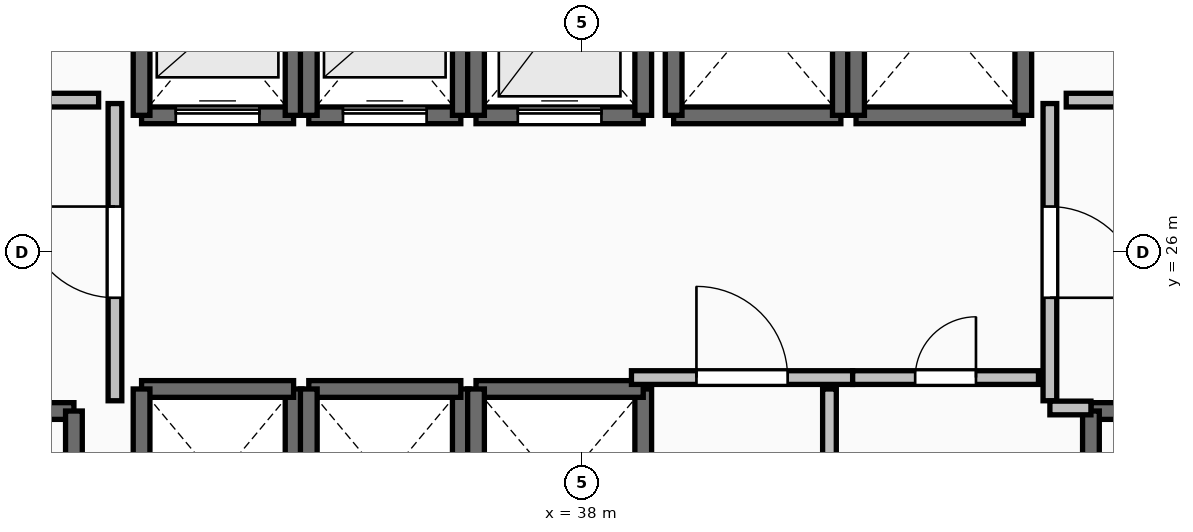
"""IFC4 building model, lengths in metres.
Left out: names, types, materials, properties, quantities, classifications, styles, units other than length and angle.
Written with IfcOpenShell. Run it as: python <this file> out.ifc"""

import sys

from ifc_helpers import new_model, si_unit, direction, frame, frame_2d, origin, place, context, subcontext, project, spatial, rectangle, extrude, element, fill, save


model = new_model("IFC4")
c1 = context("Model", 3, precision=1e-05, world=origin(), true_north=direction((0.0, 1.0)))
c2 = subcontext(c1, "Body", "Model", "MODEL_VIEW")
j1 = project(units=[si_unit("LENGTHUNIT", "METRE"), si_unit("PLANEANGLEUNIT", "RADIAN")], contexts=[c1])
p1 = place(None, origin())
s1 = spatial("IfcSite", under=j1, at=p1, CompositionType="ELEMENT")
p2 = place(p1, origin())
s2 = spatial("IfcBuilding", under=s1, at=p2, CompositionType="ELEMENT")
p3 = place(p2, frame((0.0, 0.0, 113.8)))
s3 = spatial("IfcBuildingStorey", under=s2, at=p3, CompositionType="ELEMENT", Elevation=113.8)
p4 = place(p3, frame((27.94, 23.91, 0.0), z_axis=(0.0, 0.0, 1.0), x_axis=(1.0, 0.0, 0.0)))
e1 = element("IfcWall", 1, at=p4, inside=s3, PredefinedType="SOLIDWALL", context=c2, shape_type="SweptSolid", body=[
    extrude(rectangle(XDim=3.37, YDim=0.22, at=frame_2d((1.685, 0.0))), origin(), (0.0, 0.0, 1.0), 3.24),
])
p5 = place(p4, frame((1.135, 0.0, 0.0)))
e2 = element("IfcOpeningElement", 2, at=p5, cuts=e1, PredefinedType="OPENING", context=c2, shape_type="SweptSolid", body=[
    extrude(rectangle(XDim=1.1, YDim=2.15, at=frame_2d((0.55, 1.075))), frame((0.0, 0.125, 0.0), z_axis=(0.0, -1.0, 0.0), x_axis=(1.0, 0.0, 0.0)), (0.0, 0.0, 1.0), 0.25),
])
p6 = place(p3, frame((31.31, 23.91, 0.0), z_axis=(0.0, 0.0, 1.0), x_axis=(0.0, -1.0, 0.0)))
e3 = element("IfcWall", 3, at=p6, inside=s3, PredefinedType="SOLIDWALL", context=c2, shape_type="SweptSolid", body=[
    extrude(rectangle(XDim=7.42, YDim=0.22, at=frame_2d((3.71, 0.0))), origin(), (0.0, 0.0, 1.0), 3.24),
])
p7 = place(p3, frame((44.69, 23.91, 0.0), z_axis=(0.0, 0.0, 1.0), x_axis=(1.0, 0.0, 0.0)))
e4 = element("IfcWall", 4, at=p7, inside=s3, PredefinedType="SOLIDWALL", context=c2, shape_type="SweptSolid", body=[
    extrude(rectangle(XDim=3.37, YDim=0.22, at=frame_2d((1.685, 0.0))), origin(), (0.0, 0.0, 1.0), 3.24),
])
p8 = place(p7, frame((1.135, 0.0, 0.0)))
e5 = element("IfcOpeningElement", 5, at=p8, cuts=e4, PredefinedType="OPENING", context=c2, shape_type="SweptSolid", body=[
    extrude(rectangle(XDim=1.1, YDim=2.15, at=frame_2d((0.55, 1.075))), frame((0.0, 0.125, 0.0), z_axis=(0.0, -1.0, 0.0), x_axis=(1.0, 0.0, 0.0)), (0.0, 0.0, 1.0), 0.25),
])
p9 = place(p3, frame((44.69, 16.49, 0.0), z_axis=(0.0, 0.0, 1.0), x_axis=(0.0, 1.0, 0.0)))
e6 = element("IfcWall", 6, at=p9, inside=s3, PredefinedType="SOLIDWALL", context=c2, shape_type="SweptSolid", body=[
    extrude(rectangle(XDim=7.42, YDim=0.22, at=frame_2d((3.71, 0.0))), origin(), (0.0, 0.0, 1.0), 3.24),
])
p10 = place(p3, frame((32.2, 27.8, 0.0), z_axis=(0.0, 0.0, 1.0), x_axis=(1.0, 0.0, 0.0)))
e7 = element("IfcWall", 7, at=p10, inside=s3, PredefinedType="SOLIDWALL", context=c2, shape_type="SweptSolid", body=[
    extrude(rectangle(XDim=2.0, YDim=0.22, at=frame_2d((1.0, 0.0))), origin(), (0.0, 0.0, 1.0), 3.24),
])
p11 = place(p10, frame((0.45, 0.0, 0.0)))
e8 = element("IfcOpeningElement", 8, at=p11, cuts=e7, PredefinedType="OPENING", context=c2, shape_type="SweptSolid", body=[
    extrude(rectangle(XDim=1.1, YDim=2.2, at=frame_2d((0.55, 1.1))), frame((0.0, 0.125, 0.0), z_axis=(0.0, -1.0, 0.0), x_axis=(1.0, 0.0, 0.0)), (0.0, 0.0, 1.0), 0.25),
])
for number, where, z_axis, x_axis in (
    (9, (34.2, 27.8, 0.0), (0.0, 0.0, 1.0), (0.0, 1.0, 0.0)),
    (10, (32.2, 30.2, 0.0), (0.0, 0.0, 1.0), (0.0, -1.0, 0.0)),
):
    element("IfcWall", number, at=place(p3, frame(where, z_axis=z_axis, x_axis=x_axis)), inside=s3, PredefinedType="SOLIDWALL", context=c2, shape_type="SweptSolid", body=[
        extrude(rectangle(XDim=2.4, YDim=0.22, at=frame_2d((1.2, 0.0))), origin(), (0.0, 0.0, 1.0), 3.24),
    ])
p12 = place(p3, frame((34.4, 27.8, 0.0), z_axis=(0.0, 0.0, 1.0), x_axis=(1.0, 0.0, 0.0)))
e11 = element("IfcWall", 11, at=p12, inside=s3, PredefinedType="SOLIDWALL", context=c2, shape_type="SweptSolid", body=[
    extrude(rectangle(XDim=2.0, YDim=0.22, at=frame_2d((1.0, 0.0))), origin(), (0.0, 0.0, 1.0), 3.24),
])
p13 = place(p12, frame((0.45, 0.0, 0.0)))
e12 = element("IfcOpeningElement", 12, at=p13, cuts=e11, PredefinedType="OPENING", context=c2, shape_type="SweptSolid", body=[
    extrude(rectangle(XDim=1.1, YDim=2.2, at=frame_2d((0.55, 1.1))), frame((0.0, 0.125, 0.0), z_axis=(0.0, -1.0, 0.0), x_axis=(1.0, 0.0, 0.0)), (0.0, 0.0, 1.0), 0.25),
])
for number, where, z_axis, x_axis in (
    (13, (36.4, 27.8, 0.0), (0.0, 0.0, 1.0), (0.0, 1.0, 0.0)),
    (14, (34.4, 30.2, 0.0), (0.0, 0.0, 1.0), (0.0, -1.0, 0.0)),
):
    element("IfcWall", number, at=place(p3, frame(where, z_axis=z_axis, x_axis=x_axis)), inside=s3, PredefinedType="SOLIDWALL", context=c2, shape_type="SweptSolid", body=[
        extrude(rectangle(XDim=2.4, YDim=0.22, at=frame_2d((1.2, 0.0))), origin(), (0.0, 0.0, 1.0), 3.24),
    ])
p14 = place(p3, frame((36.6, 27.8, 0.0), z_axis=(0.0, 0.0, 1.0), x_axis=(1.0, 0.0, 0.0)))
e15 = element("IfcWall", 15, at=p14, inside=s3, PredefinedType="SOLIDWALL", context=c2, shape_type="SweptSolid", body=[
    extrude(rectangle(XDim=2.2, YDim=0.22, at=frame_2d((1.1, 0.0))), origin(), (0.0, 0.0, 1.0), 3.24),
])
p15 = place(p14, frame((0.55, 0.0, 0.0)))
e16 = element("IfcOpeningElement", 16, at=p15, cuts=e15, PredefinedType="OPENING", context=c2, shape_type="SweptSolid", body=[
    extrude(rectangle(XDim=1.1, YDim=2.2, at=frame_2d((0.55, 1.1))), frame((0.0, 0.125, 0.0), z_axis=(0.0, -1.0, 0.0), x_axis=(1.0, 0.0, 0.0)), (0.0, 0.0, 1.0), 0.25),
])
for number, where, z_axis, x_axis in (
    (17, (38.8, 27.8, 0.0), (0.0, 0.0, 1.0), (0.0, 1.0, 0.0)),
    (18, (36.6, 30.4, 0.0), (0.0, 0.0, 1.0), (0.0, -1.0, 0.0)),
):
    element("IfcWall", number, at=place(p3, frame(where, z_axis=z_axis, x_axis=x_axis)), inside=s3, PredefinedType="SOLIDWALL", context=c2, shape_type="SweptSolid", body=[
        extrude(rectangle(XDim=2.6, YDim=0.22, at=frame_2d((1.3, 0.0))), origin(), (0.0, 0.0, 1.0), 3.24),
    ])
p16 = place(p3, frame((34.2, 21.8, 0.0), z_axis=(0.0, 0.0, 1.0), x_axis=(0.0, 1.0, 0.0)))
e19 = element("IfcWall", 19, at=p16, inside=s3, PredefinedType="SOLIDWALL", context=c2, shape_type="SweptSolid", body=[
    extrude(rectangle(XDim=2.4, YDim=0.22, at=frame_2d((1.2, 0.0))), origin(), (0.0, 0.0, 1.0), 3.24),
])
p17 = place(p3, frame((34.2, 24.2, 0.0), z_axis=(0.0, 0.0, 1.0), x_axis=(-1.0, 0.0, 0.0)))
e20 = element("IfcWall", 20, at=p17, inside=s3, PredefinedType="SOLIDWALL", context=c2, shape_type="SweptSolid", body=[
    extrude(rectangle(XDim=2.0, YDim=0.22, at=frame_2d((1.0, 0.0))), origin(), (0.0, 0.0, 1.0), 3.24),
])
for number, where, z_axis, x_axis in (
    (21, (32.2, 24.2, 0.0), (0.0, 0.0, 1.0), (0.0, -1.0, 0.0)),
    (22, (36.4, 21.8, 0.0), (0.0, 0.0, 1.0), (0.0, 1.0, 0.0)),
):
    element("IfcWall", number, at=place(p3, frame(where, z_axis=z_axis, x_axis=x_axis)), inside=s3, PredefinedType="SOLIDWALL", context=c2, shape_type="SweptSolid", body=[
        extrude(rectangle(XDim=2.4, YDim=0.22, at=frame_2d((1.2, 0.0))), origin(), (0.0, 0.0, 1.0), 3.24),
    ])
p18 = place(p3, frame((36.4, 24.2, 0.0), z_axis=(0.0, 0.0, 1.0), x_axis=(-1.0, 0.0, 0.0)))
e23 = element("IfcWall", 23, at=p18, inside=s3, PredefinedType="SOLIDWALL", context=c2, shape_type="SweptSolid", body=[
    extrude(rectangle(XDim=2.0, YDim=0.22, at=frame_2d((1.0, 0.0))), origin(), (0.0, 0.0, 1.0), 3.24),
])
p19 = place(p3, frame((34.4, 24.2, 0.0), z_axis=(0.0, 0.0, 1.0), x_axis=(0.0, -1.0, 0.0)))
e24 = element("IfcWall", 24, at=p19, inside=s3, PredefinedType="SOLIDWALL", context=c2, shape_type="SweptSolid", body=[
    extrude(rectangle(XDim=2.4, YDim=0.22, at=frame_2d((1.2, 0.0))), origin(), (0.0, 0.0, 1.0), 3.24),
])
p20 = place(p3, frame((38.8, 21.6, 0.0), z_axis=(0.0, 0.0, 1.0), x_axis=(0.0, 1.0, 0.0)))
e25 = element("IfcWall", 25, at=p20, inside=s3, PredefinedType="SOLIDWALL", context=c2, shape_type="SweptSolid", body=[
    extrude(rectangle(XDim=2.6, YDim=0.22, at=frame_2d((1.3, 0.0))), origin(), (0.0, 0.0, 1.0), 3.24),
])
p21 = place(p3, frame((38.8, 24.2, 0.0), z_axis=(0.0, 0.0, 1.0), x_axis=(-1.0, 0.0, 0.0)))
e26 = element("IfcWall", 26, at=p21, inside=s3, PredefinedType="SOLIDWALL", context=c2, shape_type="SweptSolid", body=[
    extrude(rectangle(XDim=2.2, YDim=0.22, at=frame_2d((1.1, 0.0))), origin(), (0.0, 0.0, 1.0), 3.24),
])
p22 = place(p3, frame((36.6, 24.2, 0.0), z_axis=(0.0, 0.0, 1.0), x_axis=(0.0, -1.0, 0.0)))
e27 = element("IfcWall", 27, at=p22, inside=s3, PredefinedType="SOLIDWALL", context=c2, shape_type="SweptSolid", body=[
    extrude(rectangle(XDim=2.6, YDim=0.22, at=frame_2d((1.3, 0.0))), origin(), (0.0, 0.0, 1.0), 3.24),
])
p23 = place(p3, frame((39.2, 27.8, 0.0), z_axis=(0.0, 0.0, 1.0), x_axis=(1.0, 0.0, 0.0)))
e28 = element("IfcWall", 28, at=p23, inside=s3, PredefinedType="SOLIDWALL", context=c2, shape_type="SweptSolid", body=[
    extrude(rectangle(XDim=2.2, YDim=0.22, at=frame_2d((1.1, 0.0))), origin(), (0.0, 0.0, 1.0), 3.24),
])
for number, where, z_axis, x_axis in (
    (29, (41.4, 27.8, 0.0), (0.0, 0.0, 1.0), (0.0, 1.0, 0.0)),
    (30, (39.2, 30.4, 0.0), (0.0, 0.0, 1.0), (0.0, -1.0, 0.0)),
):
    element("IfcWall", number, at=place(p3, frame(where, z_axis=z_axis, x_axis=x_axis)), inside=s3, PredefinedType="SOLIDWALL", context=c2, shape_type="SweptSolid", body=[
        extrude(rectangle(XDim=2.6, YDim=0.22, at=frame_2d((1.3, 0.0))), origin(), (0.0, 0.0, 1.0), 3.24),
    ])
p24 = place(p3, frame((41.6, 27.8, 0.0), z_axis=(0.0, 0.0, 1.0), x_axis=(1.0, 0.0, 0.0)))
e31 = element("IfcWall", 31, at=p24, inside=s3, PredefinedType="SOLIDWALL", context=c2, shape_type="SweptSolid", body=[
    extrude(rectangle(XDim=2.2, YDim=0.22, at=frame_2d((1.1, 0.0))), origin(), (0.0, 0.0, 1.0), 3.24),
])
for number, where, z_axis, x_axis in (
    (32, (43.8, 27.8, 0.0), (0.0, 0.0, 1.0), (0.0, 1.0, 0.0)),
    (33, (41.6, 30.4, 0.0), (0.0, 0.0, 1.0), (0.0, -1.0, 0.0)),
):
    element("IfcWall", number, at=place(p3, frame(where, z_axis=z_axis, x_axis=x_axis)), inside=s3, PredefinedType="SOLIDWALL", context=c2, shape_type="SweptSolid", body=[
        extrude(rectangle(XDim=2.6, YDim=0.22, at=frame_2d((1.3, 0.0))), origin(), (0.0, 0.0, 1.0), 3.24),
    ])
p25 = place(p3, frame((31.85, 24.045, 0.0), z_axis=(0.0, 0.0, 1.0), x_axis=(0.0, 1.0, 0.0)))
e34 = element("IfcWall", 34, at=p25, inside=s3, PredefinedType="PARTITIONING", context=c2, shape_type="SweptSolid", body=[
    extrude(rectangle(XDim=3.91, YDim=0.18, at=frame_2d((1.955, 0.0))), origin(), (0.0, 0.0, 1.0), 3.24),
])
p26 = place(p25, frame((1.355, 0.0, 0.0)))
e35 = element("IfcOpeningElement", 35, at=p26, cuts=e34, PredefinedType="OPENING", context=c2, shape_type="SweptSolid", body=[
    extrude(rectangle(XDim=1.2, YDim=2.15, at=frame_2d((0.6, 1.075))), frame((0.0, 0.105, 0.0), z_axis=(0.0, -1.0, 0.0), x_axis=(1.0, 0.0, 0.0)), (0.0, 0.0, 1.0), 0.21),
])
p27 = place(p3, frame((44.15, 27.955, 0.0), z_axis=(0.0, 0.0, 1.0), x_axis=(0.0, -1.0, 0.0)))
e36 = element("IfcWall", 36, at=p27, inside=s3, PredefinedType="PARTITIONING", context=c2, shape_type="SweptSolid", body=[
    extrude(rectangle(XDim=3.91, YDim=0.18, at=frame_2d((1.955, 0.0))), origin(), (0.0, 0.0, 1.0), 3.24),
])
p28 = place(p27, frame((1.355, 0.0, 0.0)))
e37 = element("IfcOpeningElement", 37, at=p28, cuts=e36, PredefinedType="OPENING", context=c2, shape_type="SweptSolid", body=[
    extrude(rectangle(XDim=1.2, YDim=2.15, at=frame_2d((0.6, 1.075))), frame((0.0, 0.105, 0.0), z_axis=(0.0, -1.0, 0.0), x_axis=(1.0, 0.0, 0.0)), (0.0, 0.0, 1.0), 0.21),
])
p29 = place(p3, frame((44.15, 23.95, 0.0), z_axis=(0.0, 0.0, 1.0), x_axis=(1.0, 0.0, 0.0)))
e38 = element("IfcWall", 38, at=p29, inside=s3, PredefinedType="PARTITIONING", context=c2, shape_type="SweptSolid", body=[
    extrude(rectangle(XDim=0.54, YDim=0.18, at=frame_2d((0.27, 0.0))), origin(), (0.0, 0.0, 1.0), 3.24),
])
p30 = place(p3, frame((38.645, 24.35, 0.0), z_axis=(0.0, 0.0, 1.0), x_axis=(1.0, 0.0, 0.0)))
e39 = element("IfcWall", 39, at=p30, inside=s3, PredefinedType="PARTITIONING", context=c2, shape_type="SweptSolid", body=[
    extrude(rectangle(XDim=2.91, YDim=0.18, at=frame_2d((1.455, 0.0))), origin(), (0.0, 0.0, 1.0), 3.24),
])
p31 = place(p30, frame((0.855, 0.0, 0.0)))
e40 = element("IfcOpeningElement", 40, at=p31, cuts=e39, PredefinedType="OPENING", context=c2, shape_type="SweptSolid", body=[
    extrude(rectangle(XDim=1.2, YDim=2.15, at=frame_2d((0.6, 1.075))), frame((0.0, 0.105, 0.0), z_axis=(0.0, -1.0, 0.0), x_axis=(1.0, 0.0, 0.0)), (0.0, 0.0, 1.0), 0.21),
])
p32 = place(p3, frame((41.555, 24.35, 0.0), z_axis=(0.0, 0.0, 1.0), x_axis=(1.0, 0.0, 0.0)))
e41 = element("IfcWall", 41, at=p32, inside=s3, PredefinedType="PARTITIONING", context=c2, shape_type="SweptSolid", body=[
    extrude(rectangle(XDim=2.445, YDim=0.18, at=frame_2d((1.223, 0.0))), origin(), (0.0, 0.0, 1.0), 3.24),
])
p33 = place(p32, frame((0.823, 0.0, 0.0)))
e42 = element("IfcOpeningElement", 42, at=p33, cuts=e41, PredefinedType="OPENING", context=c2, shape_type="SweptSolid", body=[
    extrude(rectangle(XDim=0.8, YDim=2.05, at=frame_2d((0.4, 1.025))), frame((0.0, 0.105, 0.0), z_axis=(0.0, -1.0, 0.0), x_axis=(1.0, 0.0, 0.0)), (0.0, 0.0, 1.0), 0.21),
])
p34 = place(p3, frame((41.25, 16.32, 0.0), z_axis=(0.0, 0.0, 1.0), x_axis=(0.0, 1.0, 0.0)))
e43 = element("IfcWall", 43, at=p34, inside=s3, PredefinedType="PARTITIONING", context=c2, shape_type="SweptSolid", body=[
    extrude(rectangle(XDim=7.88, YDim=0.18, at=frame_2d((3.94, 0.0))), origin(), (0.0, 0.0, 1.0), 3.24),
])
p35 = place(p34, frame((3.54, 0.0, 0.0)))
e44 = element("IfcOpeningElement", 44, at=p35, cuts=e43, PredefinedType="OPENING", context=c2, shape_type="SweptSolid", body=[
    extrude(rectangle(XDim=0.8, YDim=2.05, at=frame_2d((0.4, 1.025))), frame((0.0, 0.105, 0.0), z_axis=(0.0, -1.0, 0.0), x_axis=(1.0, 0.0, 0.0)), (0.0, 0.0, 1.0), 0.21),
])
for number, where, z_axis, x_axis in (
    (45, (31.635, 28.0, 0.0), (0.0, 0.0, 1.0), (-1.0, 0.0, 0.0)),
    (46, (45.28, 28.0, 0.0), (0.0, 0.0, 1.0), (-1.0, 0.0, 0.0)),
):
    element("IfcWall", number, at=place(p3, frame(where, z_axis=z_axis, x_axis=x_axis)), inside=s3, PredefinedType="PARTITIONING", context=c2, shape_type="SweptSolid", body=[
        extrude(rectangle(XDim=0.915, YDim=0.18, at=frame_2d((0.458, 0.0))), origin(), (0.0, 0.0, 1.0), 3.24),
    ])
p36 = place(p11, origin())
e47 = element("IfcDoor", 47, at=p36, inside=s3, OperationType="SLIDING_TO_LEFT", PredefinedType="DOOR", context=c2, shape_type="SweptSolid", body=[
    extrude(rectangle(XDim=1.1, YDim=2.2, at=frame_2d((0.55, 1.1))), frame((0.0, 0.025, 0.0), z_axis=(0.0, -1.0, 0.0), x_axis=(1.0, 0.0, 0.0)), (0.0, 0.0, 1.0), 0.05),
])
fill(e8, e47)
p37 = place(p13, origin())
e48 = element("IfcDoor", 48, at=p37, inside=s3, OperationType="SLIDING_TO_LEFT", PredefinedType="DOOR", context=c2, shape_type="SweptSolid", body=[
    extrude(rectangle(XDim=1.1, YDim=2.2, at=frame_2d((0.55, 1.1))), frame((0.0, 0.025, 0.0), z_axis=(0.0, -1.0, 0.0), x_axis=(1.0, 0.0, 0.0)), (0.0, 0.0, 1.0), 0.05),
])
fill(e12, e48)
p38 = place(p15, origin())
e49 = element("IfcDoor", 49, at=p38, inside=s3, OperationType="SLIDING_TO_LEFT", PredefinedType="DOOR", context=c2, shape_type="SweptSolid", body=[
    extrude(rectangle(XDim=1.1, YDim=2.2, at=frame_2d((0.55, 1.1))), frame((0.0, 0.025, 0.0), z_axis=(0.0, -1.0, 0.0), x_axis=(1.0, 0.0, 0.0)), (0.0, 0.0, 1.0), 0.05),
])
fill(e16, e49)
p39 = place(p26, origin())
e50 = element("IfcDoor", 50, at=p39, inside=s3, OperationType="SINGLE_SWING_RIGHT", PredefinedType="DOOR", context=c2, shape_type="SweptSolid", body=[
    extrude(rectangle(XDim=1.2, YDim=2.15, at=frame_2d((0.6, 1.075))), frame((0.0, 0.025, 0.0), z_axis=(0.0, -1.0, 0.0), x_axis=(1.0, 0.0, 0.0)), (0.0, 0.0, 1.0), 0.05),
])
fill(e35, e50)
p40 = place(p28, origin())
e51 = element("IfcDoor", 51, at=p40, inside=s3, OperationType="SINGLE_SWING_RIGHT", PredefinedType="DOOR", context=c2, shape_type="SweptSolid", body=[
    extrude(rectangle(XDim=1.2, YDim=2.15, at=frame_2d((0.6, 1.075))), frame((0.0, 0.025, 0.0), z_axis=(0.0, -1.0, 0.0), x_axis=(1.0, 0.0, 0.0)), (0.0, 0.0, 1.0), 0.05),
])
fill(e37, e51)
p41 = place(p31, origin())
e52 = element("IfcDoor", 52, at=p41, inside=s3, OperationType="SINGLE_SWING_LEFT", PredefinedType="DOOR", context=c2, shape_type="SweptSolid", body=[
    extrude(rectangle(XDim=1.2, YDim=2.15, at=frame_2d((0.6, 1.075))), frame((0.0, 0.025, 0.0), z_axis=(0.0, -1.0, 0.0), x_axis=(1.0, 0.0, 0.0)), (0.0, 0.0, 1.0), 0.05),
])
fill(e40, e52)
p42 = place(p33, origin())
e53 = element("IfcDoor", 53, at=p42, inside=s3, OperationType="SINGLE_SWING_RIGHT", PredefinedType="DOOR", context=c2, shape_type="SweptSolid", body=[
    extrude(rectangle(XDim=0.8, YDim=2.05, at=frame_2d((0.4, 1.025))), frame((0.0, 0.025, 0.0), z_axis=(0.0, -1.0, 0.0), x_axis=(1.0, 0.0, 0.0)), (0.0, 0.0, 1.0), 0.05),
])
fill(e42, e53)
save(model, sys.argv[1])
